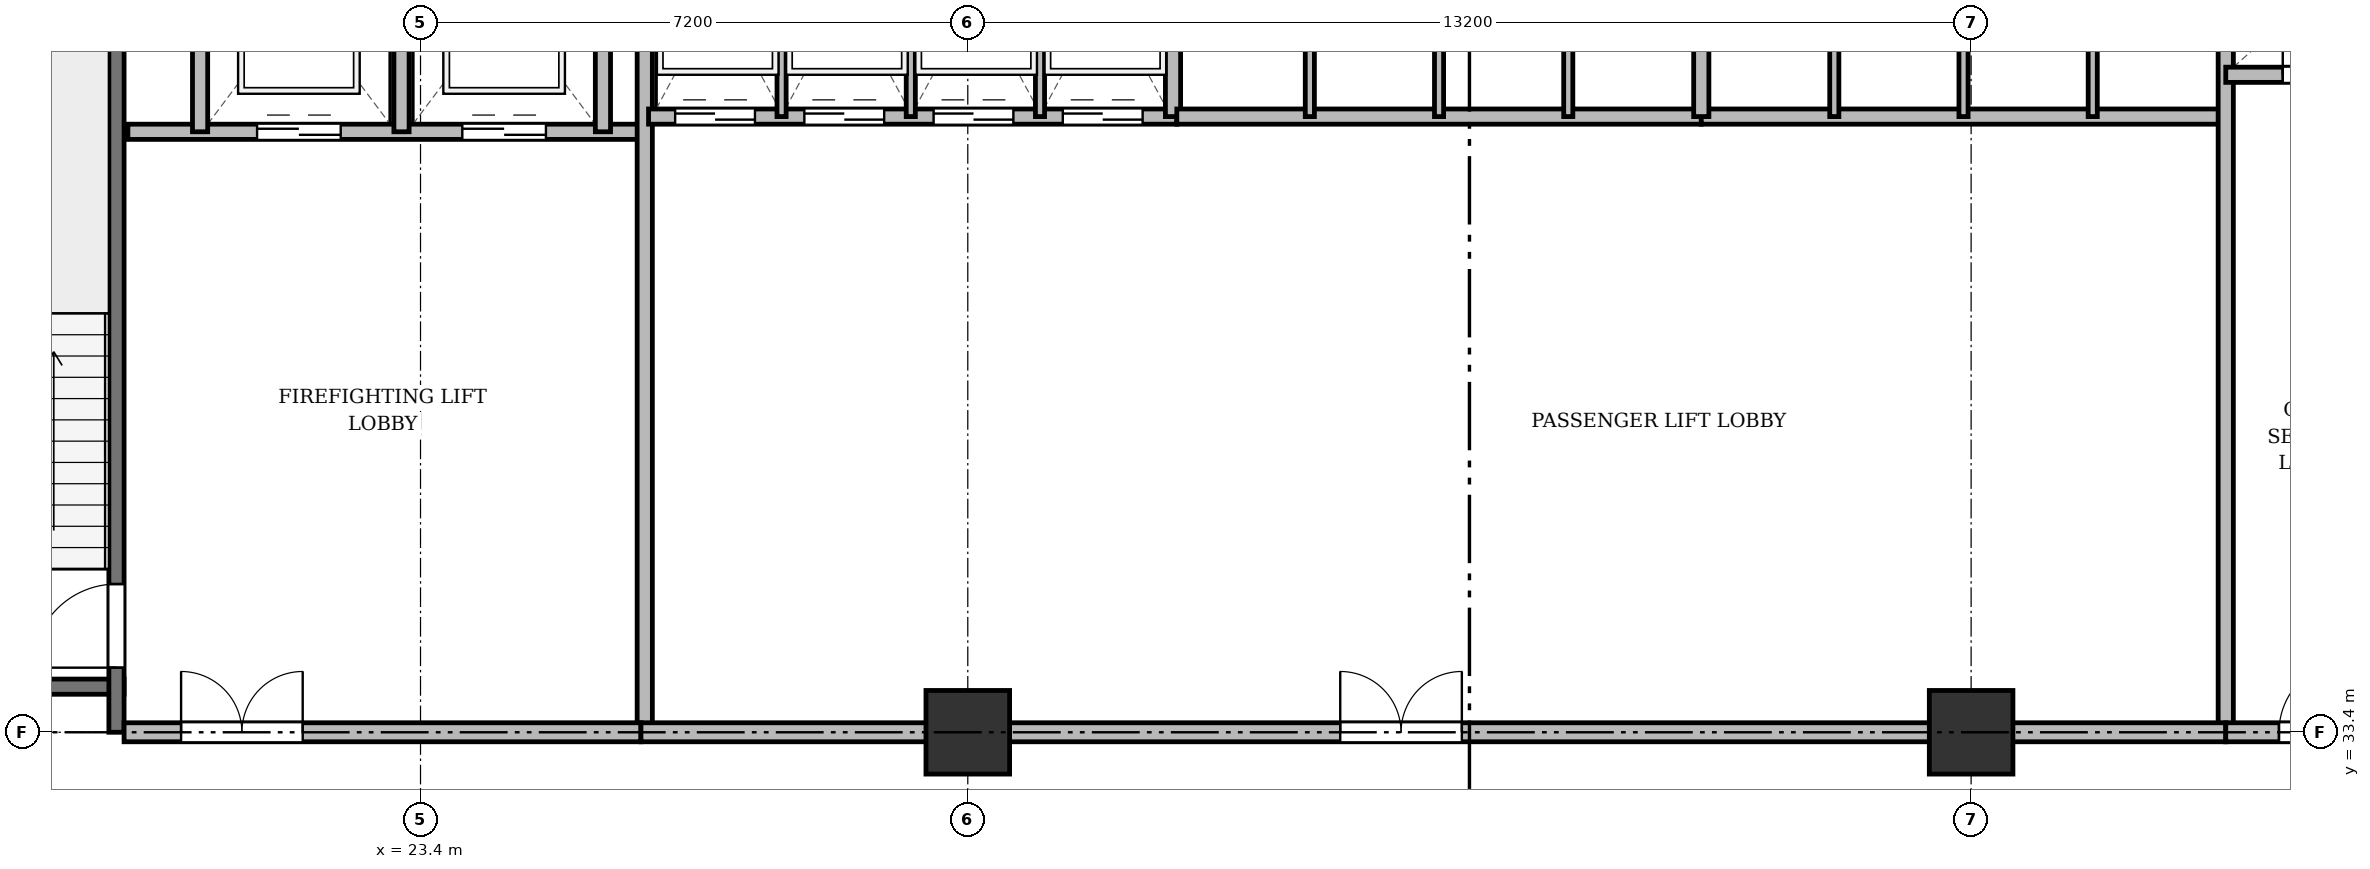
"""IFC4 building model, lengths in metres.
Left out: names, types, materials, properties, quantities, classifications, styles, units other than length and angle.
Written with IfcOpenShell. Run it as: python <this file> out.ifc"""

import sys

from ifc_helpers import new_model, si_unit, direction, frame, frame_2d, origin, origin_2d, place, context, subcontext, project, spatial, rectangle, extrude, source, transform, mapped, element, fill, save


model = new_model("IFC4")
c1 = context("Model", 3, precision=1e-05, world=origin(), true_north=direction((0.0, 1.0)))
c2 = subcontext(c1, "Body", "Model", "MODEL_VIEW")
j1 = project(units=[si_unit("LENGTHUNIT", "METRE"), si_unit("PLANEANGLEUNIT", "RADIAN")], contexts=[c1])
p1 = place(None, origin())
s1 = spatial("IfcSite", under=j1, at=p1, CompositionType="ELEMENT")
p2 = place(p1, origin())
s2 = spatial("IfcBuilding", under=s1, at=p2, CompositionType="ELEMENT")
p3 = place(p2, frame((0.0, 0.0, 9.7)))
s3 = spatial("IfcBuildingStorey", under=s2, at=p3, CompositionType="ELEMENT", Elevation=9.7)
m1 = source(origin(), c2, "Body", "SweptSolid", [
    extrude(rectangle(XDim=1.1, YDim=1.1, at=origin_2d()), origin(), (0.0, 0.0, 1.0), 4.5),
])
for number, where, z_axis, x_axis in (
    (1, (30.6, 33.4, 0.0), (0.0, 0.0, 1.0), (1.0, 0.0, 0.0)),
    (2, (43.8, 33.4, 0.0), (0.0, 0.0, 1.0), (1.0, 0.0, 0.0)),
):
    element("IfcColumn", number, at=place(p3, frame(where, z_axis=z_axis, x_axis=x_axis)), inside=s3, PredefinedType="COLUMN", context=c2, shape_type="MappedRepresentation", body=[
        mapped(m1, transform((0.0, 0.0, 0.0), x_axis=(1.0, 0.0, 0.0), y_axis=(0.0, 1.0, 0.0), z_axis=(0.0, 0.0, 1.0), scale=1.0)),
    ])
p4 = place(p3, frame((16.1, 34.0, 0.0), z_axis=(0.0, 0.0, 1.0), x_axis=(1.0, 0.0, 0.0)))
e3 = element("IfcWall", 3, at=p4, inside=s3, PredefinedType="SHEAR", context=c2, shape_type="SweptSolid", body=[
    extrude(rectangle(XDim=3.4, YDim=0.2, at=frame_2d((1.7, 0.0))), origin(), (0.0, 0.0, 1.0), 4.2),
])
p5 = place(p3, frame((19.4, 33.4, 0.0), z_axis=(0.0, 0.0, 1.0), x_axis=(0.0, 1.0, 0.0)))
e4 = element("IfcWall", 4, at=p5, inside=s3, PredefinedType="SHEAR", context=c2, shape_type="SweptSolid", body=[
    extrude(rectangle(XDim=11.1, YDim=0.2, at=frame_2d((5.55, 0.0))), origin(), (0.0, 0.0, 1.0), 4.2),
])
p6 = place(p5, frame((0.85, 0.0, 0.0)))
e5 = element("IfcOpeningElement", 5, at=p6, cuts=e4, PredefinedType="OPENING", context=c2, shape_type="SweptSolid", body=[
    extrude(rectangle(XDim=1.1, YDim=2.15, at=frame_2d((0.55, 1.075))), frame((0.0, 0.11, 0.0), z_axis=(0.0, -1.0, 0.0), x_axis=(1.0, 0.0, 0.0)), (0.0, 0.0, 1.0), 0.22),
])
p7 = place(p3, frame((19.55, 41.3, 0.0), z_axis=(0.0, 0.0, 1.0), x_axis=(1.0, 0.0, 0.0)))
e6 = element("IfcWall", 6, at=p7, inside=s3, PredefinedType="SOLIDWALL", context=c2, shape_type="SweptSolid", body=[
    extrude(rectangle(XDim=6.75, YDim=0.2, at=frame_2d((3.375, 0.0))), origin(), (0.0, 0.0, 1.0), 4.2),
])
p8 = place(p7, frame((1.7, 0.0, 0.0)))
e7 = element("IfcOpeningElement", 7, at=p8, cuts=e6, PredefinedType="OPENING", context=c2, shape_type="SweptSolid", body=[
    extrude(rectangle(XDim=1.1, YDim=2.15, at=frame_2d((0.55, 1.075))), frame((0.0, 0.11, 0.0), z_axis=(0.0, -1.0, 0.0), x_axis=(1.0, 0.0, 0.0)), (0.0, 0.0, 1.0), 0.22),
])
p9 = place(p7, frame((4.4, 0.0, 0.0)))
e8 = element("IfcOpeningElement", 8, at=p9, cuts=e6, PredefinedType="OPENING", context=c2, shape_type="SweptSolid", body=[
    extrude(rectangle(XDim=1.1, YDim=2.15, at=frame_2d((0.55, 1.075))), frame((0.0, 0.11, 0.0), z_axis=(0.0, -1.0, 0.0), x_axis=(1.0, 0.0, 0.0)), (0.0, 0.0, 1.0), 0.22),
])
for number, where, z_axis, x_axis in (
    (9, (20.5, 41.3, 0.0), (0.0, 0.0, 1.0), (0.0, 1.0, 0.0)),
    (10, (23.15, 41.3, 0.0), (0.0, 0.0, 1.0), (0.0, 1.0, 0.0)),
    (11, (25.8, 41.3, 0.0), (0.0, 0.0, 1.0), (0.0, 1.0, 0.0)),
):
    element("IfcWall", number, at=place(p3, frame(where, z_axis=z_axis, x_axis=x_axis)), inside=s3, PredefinedType="SOLIDWALL", context=c2, shape_type="SweptSolid", body=[
        extrude(rectangle(XDim=3.4, YDim=0.2, at=frame_2d((1.7, 0.0))), origin(), (0.0, 0.0, 1.0), 4.2),
    ])
p10 = place(p3, frame((26.35, 33.4, 0.0), z_axis=(0.0, 0.0, 1.0), x_axis=(0.0, 1.0, 0.0)))
e12 = element("IfcWall", 12, at=p10, inside=s3, PredefinedType="SOLIDWALL", context=c2, shape_type="SweptSolid", body=[
    extrude(rectangle(XDim=11.3, YDim=0.2, at=frame_2d((5.65, 0.0))), origin(), (0.0, 0.0, 1.0), 3.1),
])
p11 = place(p3, frame((19.5, 33.4, 0.0), z_axis=(0.0, 0.0, 1.0), x_axis=(1.0, 0.0, 0.0)))
e13 = element("IfcWall", 13, at=p11, inside=s3, PredefinedType="PARTITIONING", context=c2, shape_type="SweptSolid", body=[
    extrude(rectangle(XDim=6.8, YDim=0.25, at=frame_2d((3.4, 0.0))), origin(), (0.0, 0.0, 1.0), 3.1),
])
p12 = place(p11, frame((0.75, 0.0, 0.0)))
e14 = element("IfcOpeningElement", 14, at=p12, cuts=e13, PredefinedType="OPENING", context=c2, shape_type="SweptSolid", body=[
    extrude(rectangle(XDim=1.6, YDim=2.2, at=frame_2d((0.8, 1.1))), frame((0.0, 0.135, 0.0), z_axis=(0.0, -1.0, 0.0), x_axis=(1.0, 0.0, 0.0)), (0.0, 0.0, 1.0), 0.27),
])
p13 = place(p3, frame((26.4, 41.5, 0.0), z_axis=(0.0, 0.0, 1.0), x_axis=(1.0, 0.0, 0.0)))
e15 = element("IfcWall", 15, at=p13, inside=s3, PredefinedType="SOLIDWALL", context=c2, shape_type="SweptSolid", body=[
    extrude(rectangle(XDim=6.95, YDim=0.2, at=frame_2d((3.475, 0.0))), origin(), (0.0, 0.0, 1.0), 4.2),
])
p14 = place(p13, frame((0.35, 0.0, 0.0)))
e16 = element("IfcOpeningElement", 16, at=p14, cuts=e15, PredefinedType="OPENING", context=c2, shape_type="SweptSolid", body=[
    extrude(rectangle(XDim=1.05, YDim=2.15, at=frame_2d((0.525, 1.075))), frame((0.0, 0.11, 0.0), z_axis=(0.0, -1.0, 0.0), x_axis=(1.0, 0.0, 0.0)), (0.0, 0.0, 1.0), 0.22),
])
p15 = place(p13, frame((2.05, 0.0, 0.0)))
e17 = element("IfcOpeningElement", 17, at=p15, cuts=e15, PredefinedType="OPENING", context=c2, shape_type="SweptSolid", body=[
    extrude(rectangle(XDim=1.05, YDim=2.15, at=frame_2d((0.525, 1.075))), frame((0.0, 0.11, 0.0), z_axis=(0.0, -1.0, 0.0), x_axis=(1.0, 0.0, 0.0)), (0.0, 0.0, 1.0), 0.22),
])
p16 = place(p13, frame((3.75, 0.0, 0.0)))
e18 = element("IfcOpeningElement", 18, at=p16, cuts=e15, PredefinedType="OPENING", context=c2, shape_type="SweptSolid", body=[
    extrude(rectangle(XDim=1.05, YDim=2.15, at=frame_2d((0.525, 1.075))), frame((0.0, 0.11, 0.0), z_axis=(0.0, -1.0, 0.0), x_axis=(1.0, 0.0, 0.0)), (0.0, 0.0, 1.0), 0.22),
])
p17 = place(p13, frame((5.45, 0.0, 0.0)))
e19 = element("IfcOpeningElement", 19, at=p17, cuts=e15, PredefinedType="OPENING", context=c2, shape_type="SweptSolid", body=[
    extrude(rectangle(XDim=1.05, YDim=2.15, at=frame_2d((0.525, 1.075))), frame((0.0, 0.11, 0.0), z_axis=(0.0, -1.0, 0.0), x_axis=(1.0, 0.0, 0.0)), (0.0, 0.0, 1.0), 0.22),
])
p18 = place(p3, frame((33.3, 41.5, 0.0), z_axis=(0.0, 0.0, 1.0), x_axis=(0.0, 1.0, 0.0)))
e20 = element("IfcWall", 20, at=p18, inside=s3, PredefinedType="SOLIDWALL", context=c2, shape_type="SweptSolid", body=[
    extrude(rectangle(XDim=3.2, YDim=0.2, at=frame_2d((1.6, 0.0))), origin(), (0.0, 0.0, 1.0), 4.2),
])
for number, where, z_axis, x_axis in (
    (21, (28.15, 41.5, 0.0), (0.0, 0.0, 1.0), (0.0, 1.0, 0.0)),
    (22, (29.85, 41.5, 0.0), (0.0, 0.0, 1.0), (0.0, 1.0, 0.0)),
    (23, (31.55, 41.5, 0.0), (0.0, 0.0, 1.0), (0.0, 1.0, 0.0)),
):
    element("IfcWall", number, at=place(p3, frame(where, z_axis=z_axis, x_axis=x_axis)), inside=s3, PredefinedType="PARTITIONING", context=c2, shape_type="SweptSolid", body=[
        extrude(rectangle(XDim=3.2, YDim=0.12, at=frame_2d((1.6, 0.0))), origin(), (0.0, 0.0, 1.0), 4.2),
    ])
p19 = place(p3, frame((33.35, 41.5, 0.0), z_axis=(0.0, 0.0, 1.0), x_axis=(1.0, 0.0, 0.0)))
e24 = element("IfcWall", 24, at=p19, inside=s3, PredefinedType="SOLIDWALL", context=c2, shape_type="SweptSolid", body=[
    extrude(rectangle(XDim=6.9, YDim=0.2, at=frame_2d((3.45, 0.0))), origin(), (0.0, 0.0, 1.0), 4.2),
])
for number, where, z_axis, x_axis in (
    (25, (35.1, 41.5, 0.0), (0.0, 0.0, 1.0), (0.0, 1.0, 0.0)),
    (26, (36.8, 41.5, 0.0), (0.0, 0.0, 1.0), (0.0, 1.0, 0.0)),
    (27, (38.5, 41.5, 0.0), (0.0, 0.0, 1.0), (0.0, 1.0, 0.0)),
):
    element("IfcWall", number, at=place(p3, frame(where, z_axis=z_axis, x_axis=x_axis)), inside=s3, PredefinedType="PARTITIONING", context=c2, shape_type="SweptSolid", body=[
        extrude(rectangle(XDim=3.2, YDim=0.12, at=frame_2d((1.6, 0.0))), origin(), (0.0, 0.0, 1.0), 4.2),
    ])
p20 = place(p3, frame((40.25, 41.5, 0.0), z_axis=(0.0, 0.0, 1.0), x_axis=(1.0, 0.0, 0.0)))
e28 = element("IfcWall", 28, at=p20, inside=s3, PredefinedType="SOLIDWALL", context=c2, shape_type="SweptSolid", body=[
    extrude(rectangle(XDim=6.9, YDim=0.2, at=frame_2d((3.45, 0.0))), origin(), (0.0, 0.0, 1.0), 3.4),
])
p21 = place(p3, frame((40.25, 41.5, 0.0), z_axis=(0.0, 0.0, 1.0), x_axis=(0.0, 1.0, 0.0)))
e29 = element("IfcWall", 29, at=p21, inside=s3, PredefinedType="SOLIDWALL", context=c2, shape_type="SweptSolid", body=[
    extrude(rectangle(XDim=3.2, YDim=0.2, at=frame_2d((1.6, 0.0))), origin(), (0.0, 0.0, 1.0), 4.2),
])
p22 = place(p3, frame((42.0, 41.5, 0.0), z_axis=(0.0, 0.0, 1.0), x_axis=(0.0, 1.0, 0.0)))
e30 = element("IfcWall", 30, at=p22, inside=s3, PredefinedType="PARTITIONING", context=c2, shape_type="SweptSolid", body=[
    extrude(rectangle(XDim=3.2, YDim=0.12, at=frame_2d((1.6, 0.0))), origin(), (0.0, 0.0, 1.0), 4.2),
])
p23 = place(p3, frame((43.7, 41.5, 0.0), z_axis=(0.0, 0.0, 1.0), x_axis=(0.0, 1.0, 0.0)))
e31 = element("IfcWall", 31, at=p23, inside=s3, PredefinedType="PARTITIONING", context=c2, shape_type="SweptSolid", body=[
    extrude(rectangle(XDim=3.2, YDim=0.12, at=frame_2d((1.6, 0.0))), origin(), (0.0, 0.0, 1.0), 3.4),
])
p24 = place(p3, frame((45.4, 41.5, 0.0), z_axis=(0.0, 0.0, 1.0), x_axis=(0.0, 1.0, 0.0)))
e32 = element("IfcWall", 32, at=p24, inside=s3, PredefinedType="PARTITIONING", context=c2, shape_type="SweptSolid", body=[
    extrude(rectangle(XDim=3.2, YDim=0.12, at=frame_2d((1.6, 0.0))), origin(), (0.0, 0.0, 1.0), 4.2),
])
p25 = place(p3, frame((47.15, 33.4, 0.0), z_axis=(0.0, 0.0, 1.0), x_axis=(0.0, 1.0, 0.0)))
e33 = element("IfcWall", 33, at=p25, inside=s3, PredefinedType="SOLIDWALL", context=c2, shape_type="SweptSolid", body=[
    extrude(rectangle(XDim=11.3, YDim=0.2, at=frame_2d((5.65, 0.0))), origin(), (0.0, 0.0, 1.0), 3.1),
])
p26 = place(p3, frame((26.3, 33.4, 0.0), z_axis=(0.0, 0.0, 1.0), x_axis=(1.0, 0.0, 0.0)))
e34 = element("IfcWall", 34, at=p26, inside=s3, PredefinedType="PARTITIONING", context=c2, shape_type="SweptSolid", body=[
    extrude(rectangle(XDim=20.85, YDim=0.25, at=frame_2d((10.425, 0.0))), origin(), (0.0, 0.0, 1.0), 3.1),
])
p27 = place(p26, frame((9.2, 0.0, 0.0)))
e35 = element("IfcOpeningElement", 35, at=p27, cuts=e34, PredefinedType="OPENING", context=c2, shape_type="SweptSolid", body=[
    extrude(rectangle(XDim=1.6, YDim=2.2, at=frame_2d((0.8, 1.1))), frame((0.0, 0.135, 0.0), z_axis=(0.0, -1.0, 0.0), x_axis=(1.0, 0.0, 0.0)), (0.0, 0.0, 1.0), 0.27),
])
p28 = place(p3, frame((47.15, 42.05, 0.0), z_axis=(0.0, 0.0, 1.0), x_axis=(1.0, 0.0, 0.0)))
e36 = element("IfcWall", 36, at=p28, inside=s3, PredefinedType="SOLIDWALL", context=c2, shape_type="SweptSolid", body=[
    extrude(rectangle(XDim=7.85, YDim=0.2, at=frame_2d((3.925, 0.0))), origin(), (0.0, 0.0, 1.0), 4.2),
])
p29 = place(p28, frame((0.75, 0.0, 0.0)))
e37 = element("IfcOpeningElement", 37, at=p29, cuts=e36, PredefinedType="OPENING", context=c2, shape_type="SweptSolid", body=[
    extrude(rectangle(XDim=0.9, YDim=2.1, at=frame_2d((0.45, 1.05))), frame((0.0, 0.11, 0.0), z_axis=(0.0, -1.0, 0.0), x_axis=(1.0, 0.0, 0.0)), (0.0, 0.0, 1.0), 0.22),
])
p30 = place(p28, frame((3.85, 0.0, 0.0)))
e38 = element("IfcOpeningElement", 38, at=p30, cuts=e36, PredefinedType="OPENING", context=c2, shape_type="SweptSolid", body=[
    extrude(rectangle(XDim=0.9, YDim=2.1, at=frame_2d((0.45, 1.05))), frame((0.0, 0.11, 0.0), z_axis=(0.0, -1.0, 0.0), x_axis=(1.0, 0.0, 0.0)), (0.0, 0.0, 1.0), 0.22),
])
p31 = place(p3, frame((47.15, 33.4, 0.0), z_axis=(0.0, 0.0, 1.0), x_axis=(1.0, 0.0, 0.0)))
e39 = element("IfcWall", 39, at=p31, inside=s3, PredefinedType="PARTITIONING", context=c2, shape_type="SweptSolid", body=[
    extrude(rectangle(XDim=11.15, YDim=0.25, at=frame_2d((5.575, 0.0))), origin(), (0.0, 0.0, 1.0), 3.1),
])
p32 = place(p31, frame((0.7, 0.0, 0.0)))
e40 = element("IfcOpeningElement", 40, at=p32, cuts=e39, PredefinedType="OPENING", context=c2, shape_type="SweptSolid", body=[
    extrude(rectangle(XDim=0.95, YDim=2.15, at=frame_2d((0.475, 1.075))), frame((0.0, 0.135, 0.0), z_axis=(0.0, -1.0, 0.0), x_axis=(1.0, 0.0, 0.0)), (0.0, 0.0, 1.0), 0.27),
])
p33 = place(p31, frame((6.0, 0.0, 0.0)))
e41 = element("IfcOpeningElement", 41, at=p33, cuts=e39, PredefinedType="OPENING", context=c2, shape_type="SweptSolid", body=[
    extrude(rectangle(XDim=1.2, YDim=2.15, at=frame_2d((0.6, 1.075))), frame((0.0, 0.135, 0.0), z_axis=(0.0, -1.0, 0.0), x_axis=(1.0, 0.0, 0.0)), (0.0, 0.0, 1.0), 0.27),
])
m2 = source(origin(), c2, "Body", "SweptSolid", [
    extrude(rectangle(XDim=1.1, YDim=2.15, at=frame_2d((0.55, 1.075))), frame((0.0, 0.025, 0.0), z_axis=(0.0, -1.0, 0.0), x_axis=(1.0, 0.0, 0.0)), (0.0, 0.0, 1.0), 0.05),
])
p34 = place(p6, origin())
e42 = element("IfcDoor", 42, at=p34, inside=s3, OperationType="SINGLE_SWING_LEFT", PredefinedType="DOOR", context=c2, shape_type="MappedRepresentation", body=[
    mapped(m2, transform((0.0, 0.0, 0.0), x_axis=(1.0, 0.0, 0.0), y_axis=(0.0, 1.0, 0.0), z_axis=(0.0, 0.0, 1.0), scale=1.0)),
])
fill(e5, e42)
p35 = place(p8, origin())
e43 = element("IfcDoor", 43, at=p35, inside=s3, OperationType="DOUBLE_DOOR_SLIDING", PredefinedType="DOOR", context=c2, shape_type="MappedRepresentation", body=[
    mapped(m2, transform((0.0, 0.0, 0.0), x_axis=(1.0, 0.0, 0.0), y_axis=(0.0, 1.0, 0.0), z_axis=(0.0, 0.0, 1.0), scale=1.0)),
])
fill(e7, e43)
p36 = place(p9, origin())
e44 = element("IfcDoor", 44, at=p36, inside=s3, OperationType="DOUBLE_DOOR_SLIDING", PredefinedType="DOOR", context=c2, shape_type="MappedRepresentation", body=[
    mapped(m2, transform((0.0, 0.0, 0.0), x_axis=(1.0, 0.0, 0.0), y_axis=(0.0, 1.0, 0.0), z_axis=(0.0, 0.0, 1.0), scale=1.0)),
])
fill(e8, e44)
m3 = source(origin(), c2, "Body", "SweptSolid", [
    extrude(rectangle(XDim=1.6, YDim=2.2, at=frame_2d((0.8, 1.1))), frame((0.0, 0.025, 0.0), z_axis=(0.0, -1.0, 0.0), x_axis=(1.0, 0.0, 0.0)), (0.0, 0.0, 1.0), 0.05),
])
p37 = place(p12, origin())
e45 = element("IfcDoor", 45, at=p37, inside=s3, OperationType="DOUBLE_DOOR_SINGLE_SWING", PredefinedType="DOOR", context=c2, shape_type="MappedRepresentation", body=[
    mapped(m3, transform((0.0, 0.0, 0.0), x_axis=(1.0, 0.0, 0.0), y_axis=(0.0, 1.0, 0.0), z_axis=(0.0, 0.0, 1.0), scale=1.0)),
])
fill(e14, e45)
m4 = source(origin(), c2, "Body", "SweptSolid", [
    extrude(rectangle(XDim=1.05, YDim=2.15, at=frame_2d((0.525, 1.075))), frame((0.0, 0.025, 0.0), z_axis=(0.0, -1.0, 0.0), x_axis=(1.0, 0.0, 0.0)), (0.0, 0.0, 1.0), 0.05),
])
p38 = place(p14, origin())
e46 = element("IfcDoor", 46, at=p38, inside=s3, OperationType="DOUBLE_DOOR_SLIDING", PredefinedType="DOOR", context=c2, shape_type="MappedRepresentation", body=[
    mapped(m4, transform((0.0, 0.0, 0.0), x_axis=(1.0, 0.0, 0.0), y_axis=(0.0, 1.0, 0.0), z_axis=(0.0, 0.0, 1.0), scale=1.0)),
])
fill(e16, e46)
p39 = place(p15, origin())
e47 = element("IfcDoor", 47, at=p39, inside=s3, OperationType="DOUBLE_DOOR_SLIDING", PredefinedType="DOOR", context=c2, shape_type="MappedRepresentation", body=[
    mapped(m4, transform((0.0, 0.0, 0.0), x_axis=(1.0, 0.0, 0.0), y_axis=(0.0, 1.0, 0.0), z_axis=(0.0, 0.0, 1.0), scale=1.0)),
])
fill(e17, e47)
p40 = place(p16, origin())
e48 = element("IfcDoor", 48, at=p40, inside=s3, OperationType="DOUBLE_DOOR_SLIDING", PredefinedType="DOOR", context=c2, shape_type="MappedRepresentation", body=[
    mapped(m4, transform((0.0, 0.0, 0.0), x_axis=(1.0, 0.0, 0.0), y_axis=(0.0, 1.0, 0.0), z_axis=(0.0, 0.0, 1.0), scale=1.0)),
])
fill(e18, e48)
p41 = place(p17, origin())
e49 = element("IfcDoor", 49, at=p41, inside=s3, OperationType="DOUBLE_DOOR_SLIDING", PredefinedType="DOOR", context=c2, shape_type="MappedRepresentation", body=[
    mapped(m4, transform((0.0, 0.0, 0.0), x_axis=(1.0, 0.0, 0.0), y_axis=(0.0, 1.0, 0.0), z_axis=(0.0, 0.0, 1.0), scale=1.0)),
])
fill(e19, e49)
p42 = place(p27, origin())
e50 = element("IfcDoor", 50, at=p42, inside=s3, OperationType="DOUBLE_DOOR_SINGLE_SWING", PredefinedType="DOOR", context=c2, shape_type="MappedRepresentation", body=[
    mapped(m3, transform((0.0, 0.0, 0.0), x_axis=(1.0, 0.0, 0.0), y_axis=(0.0, 1.0, 0.0), z_axis=(0.0, 0.0, 1.0), scale=1.0)),
])
fill(e35, e50)
m5 = source(origin(), c2, "Body", "SweptSolid", [
    extrude(rectangle(XDim=0.9, YDim=2.1, at=frame_2d((0.45, 1.05))), frame((0.0, 0.025, 0.0), z_axis=(0.0, -1.0, 0.0), x_axis=(1.0, 0.0, 0.0)), (0.0, 0.0, 1.0), 0.05),
])
p43 = place(p29, origin())
e51 = element("IfcDoor", 51, at=p43, inside=s3, OperationType="SINGLE_SWING_LEFT", PredefinedType="DOOR", context=c2, shape_type="MappedRepresentation", body=[
    mapped(m5, transform((0.0, 0.0, 0.0), x_axis=(1.0, 0.0, 0.0), y_axis=(0.0, 1.0, 0.0), z_axis=(0.0, 0.0, 1.0), scale=1.0)),
])
fill(e37, e51)
m6 = source(origin(), c2, "Body", "SweptSolid", [
    extrude(rectangle(XDim=0.95, YDim=2.15, at=frame_2d((0.475, 1.075))), frame((0.0, 0.025, 0.0), z_axis=(0.0, -1.0, 0.0), x_axis=(1.0, 0.0, 0.0)), (0.0, 0.0, 1.0), 0.05),
])
p44 = place(p32, origin())
e52 = element("IfcDoor", 52, at=p44, inside=s3, OperationType="SINGLE_SWING_RIGHT", PredefinedType="DOOR", context=c2, shape_type="MappedRepresentation", body=[
    mapped(m6, transform((0.0, 0.0, 0.0), x_axis=(1.0, 0.0, 0.0), y_axis=(0.0, 1.0, 0.0), z_axis=(0.0, 0.0, 1.0), scale=1.0)),
])
fill(e40, e52)
save(model, sys.argv[1])
